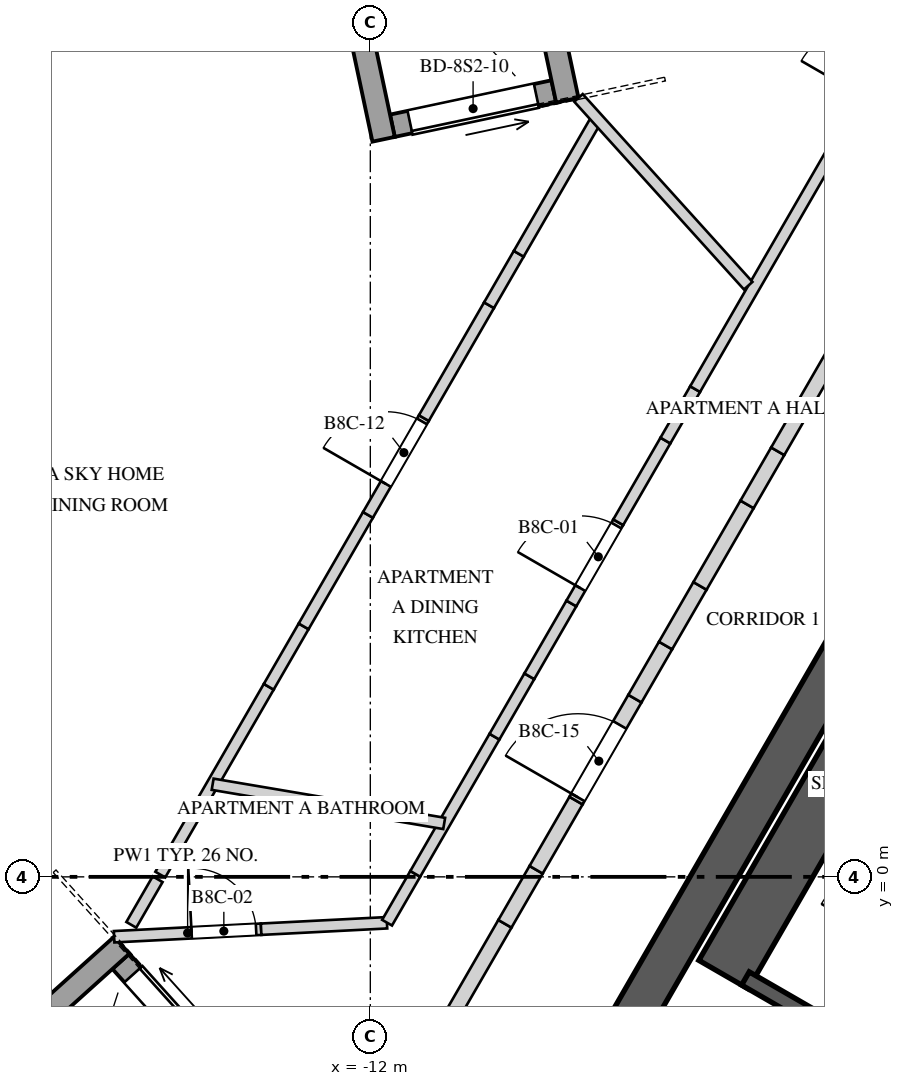
"""IFC4 building model, lengths in metres.
Left out: names, types, materials, properties, quantities, classifications, styles, units other than length and angle.
Written with IfcOpenShell. Run it as: python <this file> out.ifc"""

import sys

from ifc_helpers import new_model, si_unit, direction, frame, frame_2d, origin, place, context, subcontext, project, spatial, polyline, rectangle, outline, extrude, element, fill, save


model = new_model("IFC4")
c1 = context("Model", 3, precision=1e-05, world=origin(), true_north=direction((0.0, 1.0)))
c2 = subcontext(c1, "Body", "Model", "MODEL_VIEW")
j1 = project(units=[si_unit("LENGTHUNIT", "METRE"), si_unit("PLANEANGLEUNIT", "RADIAN")], contexts=[c1])
p1 = place(None, origin())
s1 = spatial("IfcSite", under=j1, at=p1, CompositionType="ELEMENT")
p2 = place(p1, origin())
s2 = spatial("IfcBuilding", under=s1, at=p2, CompositionType="ELEMENT")
p3 = place(p2, frame((0.0, 0.0, 344.4)))
s3 = spatial("IfcBuildingStorey", under=s2, at=p3, CompositionType="ELEMENT", Elevation=344.4)
p4 = place(p3, frame((-1.285, 10.725, 0.0), z_axis=(0.0, 0.0, 1.0), x_axis=(-0.499994590896, -0.86602852671, 0.0)))
e1 = element("IfcWall", 1, at=p4, inside=s3, PredefinedType="SHEAR", context=c2, shape_type="SweptSolid", body=[
    extrude(rectangle(XDim=17.292, YDim=0.55, at=frame_2d((8.646, 0.0))), origin(), (0.0, 0.0, 1.0), 4.0),
])
p5 = place(p4, frame((6.851, 0.0, 0.0)))
e2 = element("IfcOpeningElement", 2, at=p5, cuts=e1, PredefinedType="OPENING", context=c2, shape_type="SweptSolid", body=[
    extrude(rectangle(XDim=1.0, YDim=2.4, at=frame_2d((0.5, 1.2))), frame((0.0, 0.285, 0.0), z_axis=(0.0, -1.0, 0.0), x_axis=(1.0, 0.0, 0.0)), (0.0, 0.0, 1.0), 0.57),
])
p6 = place(p4, frame((15.089, 0.0, 0.0)))
e3 = element("IfcOpeningElement", 3, at=p6, cuts=e1, PredefinedType="OPENING", context=c2, shape_type="SweptSolid", body=[
    extrude(rectangle(XDim=0.8, YDim=2.1, at=frame_2d((0.4, 1.05))), frame((0.0, 0.285, 0.0), z_axis=(0.0, -1.0, 0.0), x_axis=(1.0, 0.0, 0.0)), (0.0, 0.0, 1.0), 0.57),
])
p7 = place(p3, frame((-15.666, 11.315, 0.0), z_axis=(0.0, 0.0, 1.0), x_axis=(-0.978148740936, -0.207906326516, 0.0)))
e4 = element("IfcWall", 4, at=p7, inside=s3, PredefinedType="SOLIDWALL", context=c2, shape_type="SweptSolid", body=[
    extrude(rectangle(XDim=2.271, YDim=0.45, at=frame_2d((1.135, 0.0))), origin(), (0.0, 0.0, 1.0), 3.3),
])
p8 = place(p7, frame((0.161, 0.0, 0.4)))
e5 = element("IfcOpeningElement", 5, at=p8, cuts=e4, PredefinedType="OPENING", context=c2, shape_type="SweptSolid", body=[
    extrude(rectangle(XDim=1.95, YDim=2.75, at=frame_2d((0.975, 1.375))), frame((0.0, 0.235, 0.0), z_axis=(0.0, -1.0, 0.0), x_axis=(1.0, 0.0, 0.0)), (0.0, 0.0, 1.0), 0.47),
])
p9 = place(p3, frame((-15.281, -1.111, 0.0), z_axis=(0.0, 0.0, 1.0), x_axis=(0.669144868344, -0.743131983681, 0.0)))
e6 = element("IfcWall", 6, at=p9, inside=s3, PredefinedType="SOLIDWALL", context=c2, shape_type="SweptSolid", body=[
    extrude(rectangle(XDim=2.171, YDim=0.3, at=frame_2d((1.085, 0.0))), origin(), (0.0, 0.0, 1.0), 3.3),
])
p10 = place(p9, frame((0.236, 0.0, 0.0)))
e7 = element("IfcOpeningElement", 7, at=p10, cuts=e6, PredefinedType="OPENING", context=c2, shape_type="SweptSolid", body=[
    extrude(rectangle(XDim=1.7, YDim=2.5, at=frame_2d((0.85, 1.25))), frame((0.0, 0.16, 0.0), z_axis=(0.0, -1.0, 0.0), x_axis=(1.0, 0.0, 0.0)), (0.0, 0.0, 1.0), 0.32),
])
p11 = place(p3, frame((-17.537, -2.94, 0.0), z_axis=(0.0, 0.0, 1.0), x_axis=(0.743118999127, 0.669159288314, 0.0)))
e8 = element("IfcWall", 8, at=p11, inside=s3, PredefinedType="SOLIDWALL", context=c2, shape_type="SweptSolid", body=[
    extrude(rectangle(XDim=3.05, YDim=0.3, at=frame_2d((1.525, 0.0))), origin(), (0.0, 0.0, 1.0), 3.3),
])
p12 = place(p3, frame((-9.586, 10.333, 0.0), z_axis=(0.0, 0.0, 1.0), x_axis=(-0.978148276005, -0.207908513891, 0.0)))
e9 = element("IfcWall", 9, at=p12, inside=s3, PredefinedType="SOLIDWALL", context=c2, shape_type="SweptSolid", body=[
    extrude(rectangle(XDim=2.171, YDim=0.3, at=frame_2d((1.085, 0.0))), origin(), (0.0, 0.0, 1.0), 3.3),
])
p13 = place(p12, frame((0.236, 0.0, 0.0)))
e10 = element("IfcOpeningElement", 10, at=p13, cuts=e9, PredefinedType="OPENING", context=c2, shape_type="SweptSolid", body=[
    extrude(rectangle(XDim=1.7, YDim=2.5, at=frame_2d((0.85, 1.25))), frame((0.0, 0.16, 0.0), z_axis=(0.0, -1.0, 0.0), x_axis=(1.0, 0.0, 0.0)), (0.0, 0.0, 1.0), 0.32),
])
for number, where, z_axis, x_axis in (
    (11, (-10.042, 13.201, 0.0), (0.0, 0.0, 1.0), (0.208, -0.978, 0.0)),
    (12, (-12.459, 12.687, 0.0), (0.0, 0.0, 1.0), (0.208, -0.978, 0.0)),
):
    element("IfcWall", number, at=place(p3, frame(where, z_axis=z_axis, x_axis=x_axis)), inside=s3, PredefinedType="SOLIDWALL", context=c2, shape_type="SweptSolid", body=[
        extrude(rectangle(XDim=3.05, YDim=0.3, at=frame_2d((1.525, 0.0))), origin(), (0.0, 0.0, 1.0), 3.3),
    ])
p14 = place(p3, frame((-4.603, 3.477, 0.0), z_axis=(0.0, 0.0, 1.0), x_axis=(-0.500015767406, -0.866016300277, 0.0)))
e13 = element("IfcWall", 13, at=p14, inside=s3, PredefinedType="SOLIDWALL", context=c2, shape_type="SweptSolid", body=[
    extrude(rectangle(XDim=5.5, YDim=0.75, at=frame_2d((2.75, 0.0))), origin(), (0.0, 0.0, 1.0), 3.65),
])
p15 = place(p3, frame((-5.03, -2.512, 0.0), z_axis=(0.0, 0.0, 1.0), x_axis=(-0.866016039709, 0.500016218704, 0.0)))
e14 = element("IfcWall", 14, at=p15, inside=s3, PredefinedType="SOLIDWALL", context=c2, shape_type="SweptSolid", body=[
    extrude(rectangle(XDim=2.35, YDim=0.2, at=frame_2d((1.175, 0.0))), origin(), (0.0, 0.0, 1.0), 3.65),
])
p16 = place(p3, frame((-5.997, -1.838, 0.0), z_axis=(0.0, 0.0, 1.0), x_axis=(0.500005610874, 0.86602216432, 0.0)))
e15 = element("IfcWall", 15, at=p16, inside=s3, PredefinedType="PARTITIONING", context=c2, shape_type="SweptSolid", body=[
    extrude(rectangle(XDim=5.1, YDim=0.08, at=frame_2d((2.55, 0.0))), origin(), (0.0, 0.0, 1.0), 3.65),
])
p17 = place(p16, frame((1.25, 0.0, 0.0)))
e16 = element("IfcOpeningElement", 16, at=p17, cuts=e15, PredefinedType="OPENING", context=c2, shape_type="SweptSolid", body=[
    extrude(rectangle(XDim=0.8, YDim=2.1, at=frame_2d((0.4, 1.05))), frame((0.0, 0.05, 0.0), z_axis=(0.0, -1.0, 0.0), x_axis=(1.0, 0.0, 0.0)), (0.0, 0.0, 1.0), 0.1),
])
p18 = place(p3, frame((-15.371, -0.788, 0.0), z_axis=(0.0, 0.0, 1.0), x_axis=(0.998683196323, 0.051301787316, 0.0)))
e17 = element("IfcWall", 17, at=p18, inside=s3, PredefinedType="PARTITIONING", context=c2, shape_type="SweptSolid", body=[
    extrude(rectangle(XDim=1.937, YDim=0.15, at=frame_2d((0.968, 0.0))), origin(), (0.0, 0.0, 1.0), 3.65),
])
p19 = place(p18, frame((1.021, 0.0, 0.0)))
e18 = element("IfcOpeningElement", 18, at=p19, cuts=e17, PredefinedType="OPENING", context=c2, shape_type="SweptSolid", body=[
    extrude(rectangle(XDim=0.85, YDim=2.4, at=frame_2d((0.425, 1.2))), frame((0.0, 0.085, 0.0), z_axis=(0.0, -1.0, 0.0), x_axis=(1.0, 0.0, 0.0)), (0.0, 0.0, 1.0), 0.17),
])
p20 = place(p3, frame((-13.437, -0.689, 0.0), z_axis=(0.0, 0.0, 1.0), x_axis=(0.99869287416, 0.05111304238, 0.0)))
e19 = element("IfcWall", 19, at=p20, inside=s3, PredefinedType="PARTITIONING", context=c2, shape_type="SweptSolid", body=[
    extrude(rectangle(XDim=1.657, YDim=0.15, at=frame_2d((0.829, 0.0))), origin(), (0.0, 0.0, 1.0), 2.95),
])
p21 = place(p3, frame((-15.145, -0.631, 0.0), z_axis=(0.0, 0.0, 1.0), x_axis=(0.499966449638, 0.866044773228, 0.0)))
e20 = element("IfcWall", 20, at=p21, inside=s3, PredefinedType="PARTITIONING", context=c2, shape_type="SweptSolid", body=[
    extrude(rectangle(XDim=0.693, YDim=0.15, at=frame_2d((0.346, 0.0))), origin(), (0.0, 0.0, 1.0), 2.95),
])
p22 = place(p3, frame((-14.763, 0.03, 0.0), z_axis=(0.0, 0.0, 1.0), x_axis=(0.500003887042, 0.866023159588, 0.0)))
e21 = element("IfcWall", 21, at=p22, inside=s3, PredefinedType="PARTITIONING", context=c2, shape_type="SweptSolid", body=[
    extrude(rectangle(XDim=2.854, YDim=0.15, at=frame_2d((1.427, 0.0))), origin(), (0.0, 0.0, 1.0), 3.65),
])
p23 = place(p3, frame((-13.336, 2.501, 0.0), z_axis=(0.0, 0.0, 1.0), x_axis=(0.500144624036, 0.865941888956, 0.0)))
e22 = element("IfcWall", 22, at=p23, inside=s3, PredefinedType="PARTITIONING", context=c2, shape_type="SweptSolid", body=[
    extrude(rectangle(XDim=0.918, YDim=0.15, at=frame_2d((0.459, 0.0))), origin(), (0.0, 0.0, 1.0), 2.55),
])
p24 = place(p3, frame((-12.877, 3.295, 0.0), z_axis=(0.0, 0.0, 1.0), x_axis=(0.499876388284, 0.86609675928, 0.0)))
e23 = element("IfcWall", 23, at=p24, inside=s3, PredefinedType="PARTITIONING", context=c2, shape_type="SweptSolid", body=[
    extrude(rectangle(XDim=1.693, YDim=0.15, at=frame_2d((0.847, 0.0))), origin(), (0.0, 0.0, 1.0), 3.65),
])
p25 = place(p3, frame((-12.031, 4.762, 0.0), z_axis=(0.0, 0.0, 1.0), x_axis=(0.50006736263, 0.865986508459, 0.0)))
e24 = element("IfcWall", 24, at=p25, inside=s3, PredefinedType="PARTITIONING", context=c2, shape_type="SweptSolid", body=[
    extrude(outline(polyline([(0.0, 0.0), (1.47, 0.0), (1.471, 3.65), (0.881, 3.65), (0.881, 2.55), (0.0, 2.55), (0.0, 0.0)])), frame((0.0, 0.075, 0.0), z_axis=(0.0, -1.0, 0.0), x_axis=(1.0, 0.0, 0.0)), (0.0, 0.0, 1.0), 0.15),
])
p26 = place(p25, frame((0.471, 0.0, 0.0)))
e25 = element("IfcOpeningElement", 25, at=p26, cuts=e24, PredefinedType="OPENING", context=c2, shape_type="SweptSolid", body=[
    extrude(rectangle(XDim=0.95, YDim=2.4, at=frame_2d((0.475, 1.2))), frame((0.0, 0.085, 0.0), z_axis=(0.0, -1.0, 0.0), x_axis=(1.0, 0.0, 0.0)), (0.0, 0.0, 1.0), 0.17),
])
p27 = place(p3, frame((-11.296, 6.035, 0.0), z_axis=(0.0, 0.0, 1.0), x_axis=(0.500059337743, 0.865991142412, 0.0)))
e26 = element("IfcWall", 26, at=p27, inside=s3, PredefinedType="PARTITIONING", context=c2, shape_type="SweptSolid", body=[
    extrude(rectangle(XDim=1.715, YDim=0.15, at=frame_2d((0.857, 0.0))), origin(), (0.0, 0.0, 1.0), 3.65),
])
p28 = place(p3, frame((-10.438, 7.52, 0.0), z_axis=(0.0, 0.0, 1.0), x_axis=(0.500001804394, 0.866024362014, 0.0)))
e27 = element("IfcWall", 27, at=p28, inside=s3, PredefinedType="PARTITIONING", context=c2, shape_type="SweptSolid", body=[
    extrude(rectangle(XDim=0.782, YDim=0.15, at=frame_2d((0.391, 0.0))), origin(), (0.0, 0.0, 1.0), 2.75),
])
p29 = place(p3, frame((-10.047, 8.197, 0.0), z_axis=(0.0, 0.0, 1.0), x_axis=(0.499972721762, 0.86604115231, 0.0)))
e28 = element("IfcWall", 28, at=p29, inside=s3, PredefinedType="PARTITIONING", context=c2, shape_type="SweptSolid", body=[
    extrude(rectangle(XDim=2.055, YDim=0.15, at=frame_2d((1.027, 0.0))), origin(), (0.0, 0.0, 1.0), 3.65),
])
p30 = place(p3, frame((-11.78, -0.603, 0.0), z_axis=(0.0, 0.0, 1.0), x_axis=(0.49999788721, 0.866026623601, 0.0)))
e29 = element("IfcWall", 29, at=p30, inside=s3, PredefinedType="PARTITIONING", context=c2, shape_type="SweptSolid", body=[
    extrude(rectangle(XDim=0.742, YDim=0.15, at=frame_2d((0.371, 0.0))), origin(), (0.0, 0.0, 1.0), 2.95),
])
p31 = place(p3, frame((-11.409, 0.039, 0.0), z_axis=(0.0, 0.0, 1.0), x_axis=(0.499969202016, 0.866043184279, 0.0)))
e30 = element("IfcWall", 30, at=p31, inside=s3, PredefinedType="PARTITIONING", context=c2, shape_type="SweptSolid", body=[
    extrude(rectangle(XDim=2.084, YDim=0.15, at=frame_2d((1.042, 0.0))), origin(), (0.0, 0.0, 1.0), 3.65),
])
p32 = place(p3, frame((-10.367, 1.844, 0.0), z_axis=(0.0, 0.0, 1.0), x_axis=(0.499945096919, 0.866057099772, 0.0)))
e31 = element("IfcWall", 31, at=p32, inside=s3, PredefinedType="PARTITIONING", context=c2, shape_type="SweptSolid", body=[
    extrude(rectangle(XDim=0.917, YDim=0.15, at=frame_2d((0.459, 0.0))), origin(), (0.0, 0.0, 1.0), 2.55),
])
p33 = place(p3, frame((-9.908, 2.639, 0.0), z_axis=(0.0, 0.0, 1.0), x_axis=(0.500009088543, 0.866020156448, 0.0)))
e32 = element("IfcWall", 32, at=p33, inside=s3, PredefinedType="PARTITIONING", context=c2, shape_type="SweptSolid", body=[
    extrude(rectangle(XDim=1.106, YDim=0.15, at=frame_2d((0.553, 0.0))), origin(), (0.0, 0.0, 1.0), 3.65),
])
p34 = place(p3, frame((-9.355, 3.597, 0.0), z_axis=(0.0, 0.0, 1.0), x_axis=(0.499990780478, 0.866030726613, 0.0)))
e33 = element("IfcWall", 33, at=p34, inside=s3, PredefinedType="PARTITIONING", context=c2, shape_type="SweptSolid", body=[
    extrude(outline(polyline([(0.0, 0.0), (1.234, 0.0), (1.234, 3.65), (0.881, 3.65), (0.881, 2.55), (0.0, 2.55), (0.0, 0.0)])), frame((0.0, 0.075, 0.0), z_axis=(0.0, -1.0, 0.0), x_axis=(1.0, 0.0, 0.0)), (0.0, 0.0, 1.0), 0.15),
])
p35 = place(p34, frame((0.234, 0.0, 0.0)))
e34 = element("IfcOpeningElement", 34, at=p35, cuts=e33, PredefinedType="OPENING", context=c2, shape_type="SweptSolid", body=[
    extrude(rectangle(XDim=0.95, YDim=2.4, at=frame_2d((0.475, 1.2))), frame((0.0, 0.085, 0.0), z_axis=(0.0, -1.0, 0.0), x_axis=(1.0, 0.0, 0.0)), (0.0, 0.0, 1.0), 0.17),
])
p36 = place(p3, frame((-8.738, 4.665, 0.0), z_axis=(0.0, 0.0, 1.0), x_axis=(0.500012022864, 0.866018462269, 0.0)))
e35 = element("IfcWall", 35, at=p36, inside=s3, PredefinedType="PARTITIONING", context=c2, shape_type="SweptSolid", body=[
    extrude(rectangle(XDim=1.241, YDim=0.15, at=frame_2d((0.62, 0.0))), origin(), (0.0, 0.0, 1.0), 3.65),
])
p37 = place(p3, frame((-8.118, 5.74, 0.0), z_axis=(0.0, 0.0, 1.0), x_axis=(0.500001804394, 0.866024362014, 0.0)))
e36 = element("IfcWall", 36, at=p37, inside=s3, PredefinedType="PARTITIONING", context=c2, shape_type="SweptSolid", body=[
    extrude(rectangle(XDim=0.782, YDim=0.15, at=frame_2d((0.391, 0.0))), origin(), (0.0, 0.0, 1.0), 2.75),
])
p38 = place(p3, frame((-7.727, 6.417, 0.0), z_axis=(0.0, 0.0, 1.0), x_axis=(0.50002680699, 0.866009926209, 0.0)))
e37 = element("IfcWall", 37, at=p38, inside=s3, PredefinedType="PARTITIONING", context=c2, shape_type="SweptSolid", body=[
    extrude(rectangle(XDim=4.12, YDim=0.15, at=frame_2d((2.06, 0.0))), origin(), (0.0, 0.0, 1.0), 3.65),
])
p39 = place(p3, frame((-11.028, 0.703, 0.0), z_axis=(0.0, 0.0, 1.0), x_axis=(-0.985959074205, 0.166987137207, 0.0)))
e38 = element("IfcWall", 38, at=p39, inside=s3, PredefinedType="PARTITIONING", context=c2, shape_type="SweptSolid", body=[
    extrude(rectangle(XDim=3.089, YDim=0.15, at=frame_2d((1.545, 0.0))), origin(), (0.0, 0.0, 1.0), 3.65),
])
p40 = place(p3, frame((-9.261, 10.248, 0.0), z_axis=(0.0, 0.0, 1.0), x_axis=(0.670469843063, -0.741936782714, 0.0)))
e39 = element("IfcWall", 39, at=p40, inside=s3, PredefinedType="PARTITIONING", context=c2, shape_type="SweptSolid", body=[
    extrude(rectangle(XDim=3.331, YDim=0.15, at=frame_2d((1.666, 0.0))), origin(), (0.0, 0.0, 1.0), 3.65),
])
p41 = place(p3, frame((-12.326, -4.25, 0.0), z_axis=(0.0, 0.0, 1.0), x_axis=(0.499982771656, 0.866035350345, 0.0)))
e40 = element("IfcWall", 40, at=p41, inside=s3, PredefinedType="SOLIDWALL", context=c2, shape_type="SweptSolid", body=[
    extrude(rectangle(XDim=4.195, YDim=0.2, at=frame_2d((2.097, 0.0))), origin(), (0.0, 0.0, 1.0), 3.65),
])
p42 = place(p3, frame((-10.229, -0.617, 0.0), z_axis=(0.0, 0.0, 1.0), x_axis=(0.5001686003, 0.865928040471, 0.0)))
e41 = element("IfcWall", 41, at=p42, inside=s3, PredefinedType="SOLIDWALL", context=c2, shape_type="SweptSolid", body=[
    extrude(rectangle(XDim=0.821, YDim=0.2, at=frame_2d((0.411, 0.0))), origin(), (0.0, 0.0, 1.0), 2.95),
])
p43 = place(p3, frame((-9.819, 0.094, 0.0), z_axis=(0.0, 0.0, 1.0), x_axis=(0.499890179513, 0.866088799389, 0.0)))
e42 = element("IfcWall", 42, at=p43, inside=s3, PredefinedType="SOLIDWALL", context=c2, shape_type="SweptSolid", body=[
    extrude(rectangle(XDim=1.05, YDim=0.2, at=frame_2d((0.525, 0.0))), origin(), (0.0, 0.0, 1.0), 3.65),
])
p44 = place(p3, frame((-9.294, 1.003, 0.0), z_axis=(0.0, 0.0, 1.0), x_axis=(0.500054401891, 0.86599399256, 0.0)))
e43 = element("IfcWall", 43, at=p44, inside=s3, PredefinedType="SOLIDWALL", context=c2, shape_type="SweptSolid", body=[
    extrude(outline(polyline([(0.0, 0.0), (1.549, 0.0), (1.549, 2.55), (0.605, 2.55), (0.605, 3.65), (0.0, 3.65), (0.0, 0.0)])), frame((0.0, 0.1, 0.0), z_axis=(0.0, -1.0, 0.0), x_axis=(1.0, 0.0, 0.0)), (0.0, 0.0, 1.0), 0.2),
])
p45 = place(p44, frame((0.05, 0.0, 0.0)))
e44 = element("IfcOpeningElement", 44, at=p45, cuts=e43, PredefinedType="OPENING", context=c2, shape_type="SweptSolid", body=[
    extrude(rectangle(XDim=1.1, YDim=2.4, at=frame_2d((0.55, 1.2))), frame((0.0, 0.11, 0.0), z_axis=(0.0, -1.0, 0.0), x_axis=(1.0, 0.0, 0.0)), (0.0, 0.0, 1.0), 0.22),
])
p46 = place(p3, frame((-8.519, 2.344, 0.0), z_axis=(0.0, 0.0, 1.0), x_axis=(0.499914554297, 0.866074730264, 0.0)))
e45 = element("IfcWall", 45, at=p46, inside=s3, PredefinedType="SOLIDWALL", context=c2, shape_type="SweptSolid", body=[
    extrude(rectangle(XDim=0.807, YDim=0.2, at=frame_2d((0.403, 0.0))), origin(), (0.0, 0.0, 1.0), 3.65),
])
p47 = place(p3, frame((-8.116, 3.043, 0.0), z_axis=(0.0, 0.0, 1.0), x_axis=(0.499994660107, 0.866028486751, 0.0)))
e46 = element("IfcWall", 46, at=p47, inside=s3, PredefinedType="SOLIDWALL", context=c2, shape_type="SweptSolid", body=[
    extrude(rectangle(XDim=0.906, YDim=0.2, at=frame_2d((0.453, 0.0))), origin(), (0.0, 0.0, 1.0), 2.55),
])
p48 = place(p3, frame((-7.663, 3.828, 0.0), z_axis=(0.0, 0.0, 1.0), x_axis=(0.499955681623, 0.866050989499, 0.0)))
e47 = element("IfcWall", 47, at=p48, inside=s3, PredefinedType="SOLIDWALL", context=c2, shape_type="SweptSolid", body=[
    extrude(rectangle(XDim=1.238, YDim=0.2, at=frame_2d((0.619, 0.0))), origin(), (0.0, 0.0, 1.0), 3.65),
])
p49 = place(p3, frame((-7.044, 4.9, 0.0), z_axis=(0.0, 0.0, 1.0), x_axis=(0.500141487433, 0.865943700565, 0.0)))
e48 = element("IfcWall", 48, at=p49, inside=s3, PredefinedType="SOLIDWALL", context=c2, shape_type="SweptSolid", body=[
    extrude(rectangle(XDim=0.807, YDim=0.2, at=frame_2d((0.403, 0.0))), origin(), (0.0, 0.0, 1.0), 2.75),
])
p50 = place(p3, frame((-6.64, 5.599, 0.0), z_axis=(0.0, 0.0, 1.0), x_axis=(0.499989998285, 0.8660311782, 0.0)))
e49 = element("IfcWall", 49, at=p50, inside=s3, PredefinedType="SOLIDWALL", context=c2, shape_type="SweptSolid", body=[
    extrude(rectangle(XDim=3.423, YDim=0.2, at=frame_2d((1.711, 0.0))), origin(), (0.0, 0.0, 1.0), 3.65),
])
p51 = place(p8, origin())
e50 = element("IfcWindow", 50, at=p51, inside=s3, PartitioningType="SINGLE_PANEL", PredefinedType="WINDOW", context=c2, shape_type="SweptSolid", body=[
    extrude(rectangle(XDim=1.95, YDim=2.75, at=frame_2d((0.975, 1.375))), frame((0.0, 0.03, 0.0), z_axis=(0.0, -1.0, 0.0), x_axis=(1.0, 0.0, 0.0)), (0.0, 0.0, 1.0), 0.06),
])
fill(e5, e50)
p52 = place(p10, origin())
e51 = element("IfcDoor", 51, at=p52, inside=s3, OperationType="SLIDING_TO_LEFT", PredefinedType="DOOR", context=c2, shape_type="SweptSolid", body=[
    extrude(rectangle(XDim=1.7, YDim=2.5, at=frame_2d((0.85, 1.25))), frame((0.0, 0.025, 0.0), z_axis=(0.0, -1.0, 0.0), x_axis=(1.0, 0.0, 0.0)), (0.0, 0.0, 1.0), 0.05),
])
fill(e7, e51)
p53 = place(p13, origin())
e52 = element("IfcDoor", 52, at=p53, inside=s3, OperationType="SLIDING_TO_LEFT", PredefinedType="DOOR", context=c2, shape_type="SweptSolid", body=[
    extrude(rectangle(XDim=1.7, YDim=2.5, at=frame_2d((0.85, 1.25))), frame((0.0, 0.025, 0.0), z_axis=(0.0, -1.0, 0.0), x_axis=(1.0, 0.0, 0.0)), (0.0, 0.0, 1.0), 0.05),
])
fill(e10, e52)
p54 = place(p35, origin())
e53 = element("IfcDoor", 53, at=p54, inside=s3, OperationType="SINGLE_SWING_LEFT", PredefinedType="DOOR", context=c2, shape_type="SweptSolid", body=[
    extrude(rectangle(XDim=0.95, YDim=2.4, at=frame_2d((0.475, 1.2))), frame((0.0, 0.025, 0.0), z_axis=(0.0, -1.0, 0.0), x_axis=(1.0, 0.0, 0.0)), (0.0, 0.0, 1.0), 0.05),
])
fill(e34, e53)
p55 = place(p19, origin())
e54 = element("IfcDoor", 54, at=p55, inside=s3, OperationType="SINGLE_SWING_RIGHT", PredefinedType="DOOR", context=c2, shape_type="SweptSolid", body=[
    extrude(rectangle(XDim=0.85, YDim=2.4, at=frame_2d((0.425, 1.2))), frame((0.0, 0.025, 0.0), z_axis=(0.0, -1.0, 0.0), x_axis=(1.0, 0.0, 0.0)), (0.0, 0.0, 1.0), 0.05),
])
fill(e18, e54)
p56 = place(p26, origin())
e55 = element("IfcDoor", 55, at=p56, inside=s3, OperationType="SINGLE_SWING_RIGHT", PredefinedType="DOOR", context=c2, shape_type="SweptSolid", body=[
    extrude(rectangle(XDim=0.95, YDim=2.4, at=frame_2d((0.475, 1.2))), frame((0.0, 0.025, 0.0), z_axis=(0.0, -1.0, 0.0), x_axis=(1.0, 0.0, 0.0)), (0.0, 0.0, 1.0), 0.05),
])
fill(e25, e55)
p57 = place(p45, origin())
e56 = element("IfcDoor", 56, at=p57, inside=s3, OperationType="SINGLE_SWING_LEFT", PredefinedType="DOOR", context=c2, shape_type="SweptSolid", body=[
    extrude(rectangle(XDim=1.1, YDim=2.4, at=frame_2d((0.55, 1.2))), frame((0.0, 0.025, 0.0), z_axis=(0.0, -1.0, 0.0), x_axis=(1.0, 0.0, 0.0)), (0.0, 0.0, 1.0), 0.05),
])
fill(e44, e56)
save(model, sys.argv[1])
